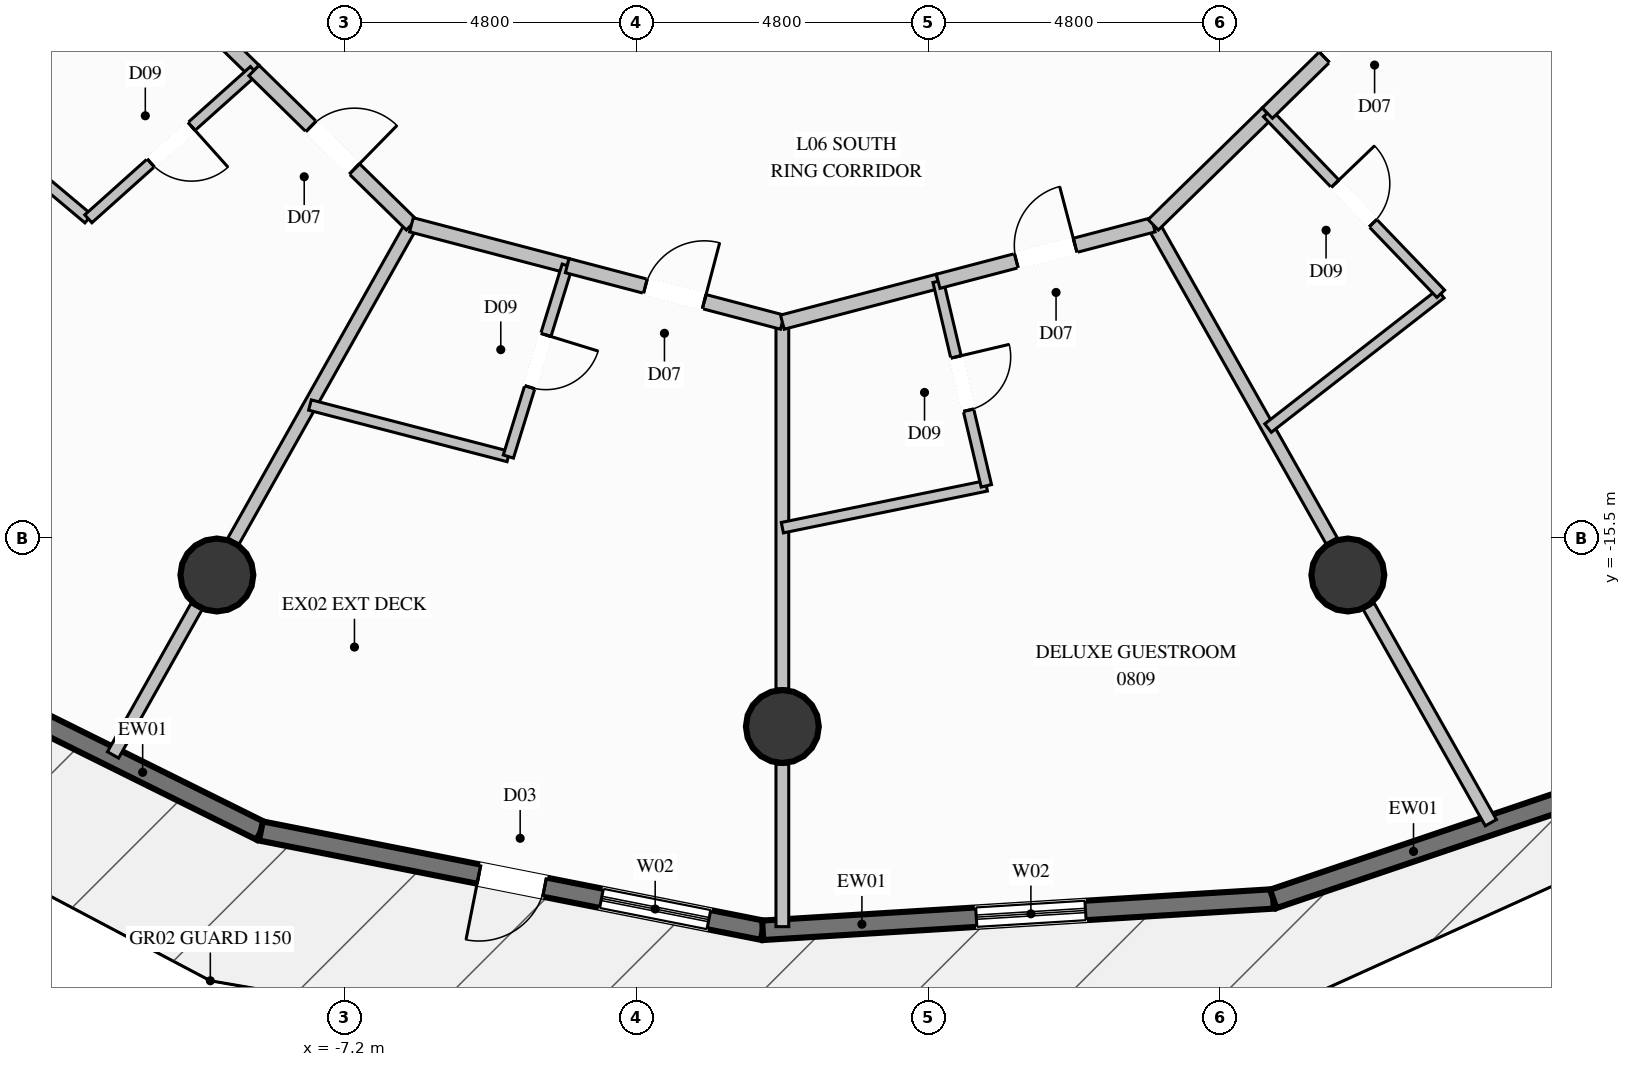
"""IFC4 building model, lengths in metres.
Left out: names, types, materials, properties, quantities, classifications, styles, units other than length and angle.
Written with IfcOpenShell. Run it as: python <this file> out.ifc"""

import sys

from ifc_helpers import new_model, si_unit, direction, frame, frame_2d, origin, origin_2d, place, context, subcontext, project, spatial, rectangle, circle, extrude, element, fill, save


model = new_model("IFC4")
c1 = context("Model", 3, precision=1e-05, world=origin(), true_north=direction((0.0, 1.0)))
c2 = subcontext(c1, "Body", "Model", "MODEL_VIEW")
j1 = project(units=[si_unit("LENGTHUNIT", "METRE"), si_unit("PLANEANGLEUNIT", "RADIAN")], contexts=[c1])
p1 = place(None, origin())
s1 = spatial("IfcSite", under=j1, at=p1, CompositionType="ELEMENT")
p2 = place(p1, origin())
s2 = spatial("IfcBuilding", under=s1, at=p2, CompositionType="ELEMENT")
p3 = place(p2, frame((0.0, 0.0, 32.0)))
s3 = spatial("IfcBuildingStorey", under=s2, at=p3, CompositionType="ELEMENT", Elevation=32.0)
for number, where, z_axis, x_axis in (
    (1, (-9.3, -16.108, 0.0), (0.0, 0.0, 1.0), (1.0, 0.0, 0.0)),
    (2, (0.0, -18.6, 0.0), (0.0, 0.0, 1.0), (1.0, 0.0, 0.0)),
    (3, (9.3, -16.108, 0.0), (0.0, 0.0, 1.0), (1.0, 0.0, 0.0)),
):
    element("IfcColumn", number, at=place(p3, frame(where, z_axis=z_axis, x_axis=x_axis)), inside=s3, PredefinedType="COLUMN", context=c2, shape_type="SweptSolid", body=[
        extrude(circle(Radius=0.6, at=origin_2d()), origin(), (0.0, 0.0, 1.0), 3.6),
    ])
p4 = place(p3, frame((-8.576, -20.318, 0.0), z_axis=(0.0, 0.0, 1.0), x_axis=(-0.895818759339, 0.444419565743, 0.0)))
e4 = element("IfcWall", 4, at=p4, inside=s3, PredefinedType="SOLIDWALL", context=c2, shape_type="SweptSolid", body=[
    extrude(rectangle(XDim=8.15, YDim=0.32, at=frame_2d((4.075, 0.0))), origin(), (0.0, 0.0, 1.0), 3.34),
])
p5 = place(p4, frame((4.592, 0.0, 0.35)))
e5 = element("IfcOpeningElement", 5, at=p5, cuts=e4, PredefinedType="OPENING", context=c2, shape_type="SweptSolid", body=[
    extrude(rectangle(XDim=1.8, YDim=2.6, at=frame_2d((0.9, 1.3))), frame((0.0, 0.17, 0.0), z_axis=(0.0, -1.0, 0.0), x_axis=(1.0, 0.0, 0.0)), (0.0, 0.0, 1.0), 0.34),
])
p6 = place(p3, frame((-0.323, -21.951, 0.0), z_axis=(0.0, 0.0, 1.0), x_axis=(-0.980984848571, 0.194084329288, 0.0)))
e6 = element("IfcWall", 6, at=p6, inside=s3, PredefinedType="SOLIDWALL", context=c2, shape_type="SweptSolid", body=[
    extrude(rectangle(XDim=8.413, YDim=0.32, at=frame_2d((4.207, 0.0))), origin(), (0.0, 0.0, 1.0), 3.34),
])
p7 = place(p6, frame((0.903, 0.0, 0.35)))
e7 = element("IfcOpeningElement", 7, at=p7, cuts=e6, PredefinedType="OPENING", context=c2, shape_type="SweptSolid", body=[
    extrude(rectangle(XDim=1.8, YDim=2.6, at=frame_2d((0.9, 1.3))), frame((0.0, 0.17, 0.0), z_axis=(0.0, -1.0, 0.0), x_axis=(1.0, 0.0, 0.0)), (0.0, 0.0, 1.0), 0.34),
])
p8 = place(p6, frame((3.657, 0.0, 0.0)))
e8 = element("IfcOpeningElement", 8, at=p8, cuts=e6, PredefinedType="OPENING", context=c2, shape_type="SweptSolid", body=[
    extrude(rectangle(XDim=1.1, YDim=2.2, at=frame_2d((0.55, 1.1))), frame((0.0, 0.17, 0.0), z_axis=(0.0, -1.0, 0.0), x_axis=(1.0, 0.0, 0.0)), (0.0, 0.0, 1.0), 0.34),
])
p9 = place(p3, frame((8.073, -21.435, 0.0), z_axis=(0.0, 0.0, 1.0), x_axis=(-0.998117750792, -0.06132663005, 0.0)))
e9 = element("IfcWall", 9, at=p9, inside=s3, PredefinedType="SOLIDWALL", context=c2, shape_type="SweptSolid", body=[
    extrude(rectangle(XDim=8.412, YDim=0.32, at=frame_2d((4.206, 0.0))), origin(), (0.0, 0.0, 1.0), 3.34),
])
p10 = place(p9, frame((3.093, 0.0, 0.35)))
e10 = element("IfcOpeningElement", 10, at=p10, cuts=e9, PredefinedType="OPENING", context=c2, shape_type="SweptSolid", body=[
    extrude(rectangle(XDim=1.8, YDim=2.6, at=frame_2d((0.9, 1.3))), frame((0.0, 0.17, 0.0), z_axis=(0.0, -1.0, 0.0), x_axis=(1.0, 0.0, 0.0)), (0.0, 0.0, 1.0), 0.34),
])
p11 = place(p3, frame((15.793, -18.821, 0.0), z_axis=(0.0, 0.0, 1.0), x_axis=(-0.94717495877, -0.320717317085, 0.0)))
e11 = element("IfcWall", 11, at=p11, inside=s3, PredefinedType="SOLIDWALL", context=c2, shape_type="SweptSolid", body=[
    extrude(rectangle(XDim=8.151, YDim=0.32, at=frame_2d((4.075, 0.0))), origin(), (0.0, 0.0, 1.0), 3.34),
])
p12 = place(p11, frame((1.229, 0.0, 0.35)))
e12 = element("IfcOpeningElement", 12, at=p12, cuts=e11, PredefinedType="OPENING", context=c2, shape_type="SweptSolid", body=[
    extrude(rectangle(XDim=1.8, YDim=2.6, at=frame_2d((0.9, 1.3))), frame((0.0, 0.17, 0.0), z_axis=(0.0, -1.0, 0.0), x_axis=(1.0, 0.0, 0.0)), (0.0, 0.0, 1.0), 0.34),
])
p13 = place(p3, frame((-10.566, -5.975, 0.0), z_axis=(0.0, 0.0, 1.0), x_axis=(-0.861473203585, -0.507803032194, 0.0)))
e13 = element("IfcWall", 13, at=p13, inside=s3, PredefinedType="PARTITIONING", context=c2, shape_type="SweptSolid", body=[
    extrude(rectangle(XDim=5.845, YDim=0.21, at=frame_2d((2.922, 0.0))), origin(), (0.0, 0.0, 1.0), 2.709),
])
p14 = place(p3, frame((-6.1, -10.349, 0.0), z_axis=(0.0, 0.0, 1.0), x_axis=(-0.490503945764, -0.871438970433, 0.0)))
e14 = element("IfcWall", 14, at=p14, inside=s3, PredefinedType="PARTITIONING", context=c2, shape_type="SweptSolid", body=[
    extrude(rectangle(XDim=5.969, YDim=0.21, at=frame_2d((2.985, 0.0))), origin(), (0.0, 0.0, 1.0), 2.709),
])
p15 = place(p3, frame((-9.636, -16.629, 0.0), z_axis=(0.0, 0.0, 1.0), x_axis=(-0.490451821351, -0.871468307475, 0.0)))
e15 = element("IfcWall", 15, at=p15, inside=s3, PredefinedType="PARTITIONING", context=c2, shape_type="SweptSolid", body=[
    extrude(rectangle(XDim=2.798, YDim=0.21, at=frame_2d((1.399, 0.0))), origin(), (0.0, 0.0, 1.0), 3.34),
])
p16 = place(p3, frame((0.0, -11.95, 0.0), z_axis=(0.0, 0.0, 1.0), x_axis=(0.0, -1.0, 0.0)))
e16 = element("IfcWall", 16, at=p16, inside=s3, PredefinedType="PARTITIONING", context=c2, shape_type="SweptSolid", body=[
    extrude(rectangle(XDim=6.03, YDim=0.21, at=frame_2d((3.015, 0.0))), origin(), (0.0, 0.0, 1.0), 2.709),
])
p17 = place(p3, frame((0.0, -19.22, 0.0), z_axis=(0.0, 0.0, 1.0), x_axis=(0.0, -1.0, 0.0)))
e17 = element("IfcWall", 17, at=p17, inside=s3, PredefinedType="PARTITIONING", context=c2, shape_type="SweptSolid", body=[
    extrude(rectangle(XDim=2.671, YDim=0.21, at=frame_2d((1.335, 0.0))), origin(), (0.0, 0.0, 1.0), 3.34),
])
p18 = place(p3, frame((6.1, -10.349, 0.0), z_axis=(0.0, 0.0, 1.0), x_axis=(0.491652896219, -0.870791266401, 0.0)))
e18 = element("IfcWall", 18, at=p18, inside=s3, PredefinedType="PARTITIONING", context=c2, shape_type="SweptSolid", body=[
    extrude(rectangle(XDim=5.969, YDim=0.21, at=frame_2d((2.985, 0.0))), origin(), (0.0, 0.0, 1.0), 2.709),
])
p19 = place(p3, frame((9.643, -16.624, 0.0), z_axis=(0.0, 0.0, 1.0), x_axis=(0.491698874435, -0.87076530528, 0.0)))
e19 = element("IfcWall", 19, at=p19, inside=s3, PredefinedType="PARTITIONING", context=c2, shape_type="SweptSolid", body=[
    extrude(rectangle(XDim=4.086, YDim=0.21, at=frame_2d((2.043, 0.0))), origin(), (0.0, 0.0, 1.0), 3.34),
])
p20 = place(p3, frame((10.566, -5.975, 0.0), z_axis=(0.0, 0.0, 1.0), x_axis=(0.862217531027, -0.506538181374, 0.0)))
e20 = element("IfcWall", 20, at=p20, inside=s3, PredefinedType="PARTITIONING", context=c2, shape_type="SweptSolid", body=[
    extrude(rectangle(XDim=5.845, YDim=0.21, at=frame_2d((2.923, 0.0))), origin(), (0.0, 0.0, 1.0), 2.709),
])
p21 = place(p3, frame((-10.566, -5.975, 0.0), z_axis=(0.0, 0.0, 1.0), x_axis=(0.714506552913, -0.699628748584, 0.0)))
e21 = element("IfcWall", 21, at=p21, inside=s3, PredefinedType="PARTITIONING", context=c2, shape_type="SweptSolid", body=[
    extrude(rectangle(XDim=2.625, YDim=0.24, at=frame_2d((1.313, 0.0))), origin(), (0.0, 0.0, 1.0), 3.34),
])
p22 = place(p3, frame((-14.055, -8.032, 0.0), z_axis=(0.0, 0.0, 1.0), x_axis=(0.765749489357, -0.643138958196, 0.0)))
e22 = element("IfcWall", 22, at=p22, inside=s3, PredefinedType="PLUMBINGWALL", context=c2, shape_type="SweptSolid", body=[
    extrude(rectangle(XDim=3.449, YDim=0.175, at=frame_2d((1.724, 0.0))), origin(), (0.0, 0.0, 1.0), 3.34),
])
p23 = place(p3, frame((-8.69, -7.812, 0.0), z_axis=(0.0, 0.0, 1.0), x_axis=(-0.745157470099, -0.666888554975, 0.0)))
e23 = element("IfcWall", 23, at=p23, inside=s3, PredefinedType="PLUMBINGWALL", context=c2, shape_type="SweptSolid", body=[
    extrude(rectangle(XDim=3.656, YDim=0.175, at=frame_2d((1.828, 0.0))), origin(), (0.0, 0.0, 1.0), 3.34),
])
p24 = place(p23, frame((1.378, 0.0, 0.0)))
e24 = element("IfcOpeningElement", 24, at=p24, cuts=e23, PredefinedType="OPENING", context=c2, shape_type="SweptSolid", body=[
    extrude(rectangle(XDim=0.9, YDim=2.1, at=frame_2d((0.45, 1.05))), frame((0.0, 0.098, 0.0), z_axis=(0.0, -1.0, 0.0), x_axis=(1.0, 0.0, 0.0)), (0.0, 0.0, 1.0), 0.195),
])
p25 = place(p3, frame((-8.69, -7.812, 0.0), z_axis=(0.0, 0.0, 1.0), x_axis=(0.714342093268, -0.699796666029, 0.0)))
e25 = element("IfcWall", 25, at=p25, inside=s3, PredefinedType="PARTITIONING", context=c2, shape_type="SweptSolid", body=[
    extrude(rectangle(XDim=3.625, YDim=0.24, at=frame_2d((1.813, 0.0))), origin(), (0.0, 0.0, 1.0), 3.34),
])
p26 = place(p25, frame((1.313, 0.0, 0.0)))
e26 = element("IfcOpeningElement", 26, at=p26, cuts=e25, PredefinedType="OPENING", context=c2, shape_type="SweptSolid", body=[
    extrude(rectangle(XDim=1.0, YDim=2.2, at=frame_2d((0.5, 1.1))), frame((0.0, 0.13, 0.0), z_axis=(0.0, -1.0, 0.0), x_axis=(1.0, 0.0, 0.0)), (0.0, 0.0, 1.0), 0.26),
])
p27 = place(p3, frame((-6.1, -10.349, 0.0), z_axis=(0.0, 0.0, 1.0), x_axis=(0.967291490053, -0.253667446219, 0.0)))
e27 = element("IfcWall", 27, at=p27, inside=s3, PredefinedType="PARTITIONING", context=c2, shape_type="SweptSolid", body=[
    extrude(rectangle(XDim=2.649, YDim=0.24, at=frame_2d((1.324, 0.0))), origin(), (0.0, 0.0, 1.0), 3.34),
])
p28 = place(p3, frame((-7.769, -13.313, 0.0), z_axis=(0.0, 0.0, 1.0), x_axis=(0.96792648556, -0.251233593596, 0.0)))
e28 = element("IfcWall", 28, at=p28, inside=s3, PredefinedType="PLUMBINGWALL", context=c2, shape_type="SweptSolid", body=[
    extrude(rectangle(XDim=3.371, YDim=0.175, at=frame_2d((1.686, 0.0))), origin(), (0.0, 0.0, 1.0), 3.34),
])
p29 = place(p3, frame((-3.538, -11.021, 0.0), z_axis=(0.0, 0.0, 1.0), x_axis=(-0.294696857094, -0.955590792347, 0.0)))
e29 = element("IfcWall", 29, at=p29, inside=s3, PredefinedType="PLUMBINGWALL", context=c2, shape_type="SweptSolid", body=[
    extrude(rectangle(XDim=3.285, YDim=0.175, at=frame_2d((1.643, 0.0))), origin(), (0.0, 0.0, 1.0), 3.34),
])
p30 = place(p29, frame((1.192, 0.0, 0.0)))
e30 = element("IfcOpeningElement", 30, at=p30, cuts=e29, PredefinedType="OPENING", context=c2, shape_type="SweptSolid", body=[
    extrude(rectangle(XDim=0.9, YDim=2.1, at=frame_2d((0.45, 1.05))), frame((0.0, 0.098, 0.0), z_axis=(0.0, -1.0, 0.0), x_axis=(1.0, 0.0, 0.0)), (0.0, 0.0, 1.0), 0.195),
])
p31 = place(p3, frame((-3.538, -11.021, 0.0), z_axis=(0.0, 0.0, 1.0), x_axis=(0.96721703222, -0.253951201187, 0.0)))
e31 = element("IfcWall", 31, at=p31, inside=s3, PredefinedType="PARTITIONING", context=c2, shape_type="SweptSolid", body=[
    extrude(rectangle(XDim=3.658, YDim=0.24, at=frame_2d((1.829, 0.0))), origin(), (0.0, 0.0, 1.0), 2.919),
])
p32 = place(p31, frame((1.329, 0.0, 0.0)))
e32 = element("IfcOpeningElement", 32, at=p32, cuts=e31, PredefinedType="OPENING", context=c2, shape_type="SweptSolid", body=[
    extrude(rectangle(XDim=1.0, YDim=2.2, at=frame_2d((0.5, 1.1))), frame((0.0, 0.13, 0.0), z_axis=(0.0, -1.0, 0.0), x_axis=(1.0, 0.0, 0.0)), (0.0, 0.0, 1.0), 0.26),
])
p33 = place(p3, frame((0.0, -11.95, 0.0), z_axis=(0.0, 0.0, 1.0), x_axis=(0.967291490053, 0.253667446219, 0.0)))
e33 = element("IfcWall", 33, at=p33, inside=s3, PredefinedType="PARTITIONING", context=c2, shape_type="SweptSolid", body=[
    extrude(rectangle(XDim=2.649, YDim=0.24, at=frame_2d((1.324, 0.0))), origin(), (0.0, 0.0, 1.0), 2.919),
])
p34 = place(p3, frame((0.0, -15.33, 0.0), z_axis=(0.0, 0.0, 1.0), x_axis=(0.979614932167, 0.20088450581, 0.0)))
e34 = element("IfcWall", 34, at=p34, inside=s3, PredefinedType="PLUMBINGWALL", context=c2, shape_type="SweptSolid", body=[
    extrude(rectangle(XDim=3.425, YDim=0.175, at=frame_2d((1.712, 0.0))), origin(), (0.0, 0.0, 1.0), 3.34),
])
p35 = place(p3, frame((2.562, -11.278, 0.0), z_axis=(0.0, 0.0, 1.0), x_axis=(0.229433036384, -0.973324448381, 0.0)))
e35 = element("IfcWall", 35, at=p35, inside=s3, PredefinedType="PLUMBINGWALL", context=c2, shape_type="SweptSolid", body=[
    extrude(rectangle(XDim=3.456, YDim=0.175, at=frame_2d((1.728, 0.0))), origin(), (0.0, 0.0, 1.0), 3.34),
])
p36 = place(p35, frame((1.278, 0.0, 0.0)))
e36 = element("IfcOpeningElement", 36, at=p36, cuts=e35, PredefinedType="OPENING", context=c2, shape_type="SweptSolid", body=[
    extrude(rectangle(XDim=0.9, YDim=2.1, at=frame_2d((0.45, 1.05))), frame((0.0, 0.098, 0.0), z_axis=(0.0, -1.0, 0.0), x_axis=(1.0, 0.0, 0.0)), (0.0, 0.0, 1.0), 0.195),
])
p37 = place(p3, frame((2.562, -11.278, 0.0), z_axis=(0.0, 0.0, 1.0), x_axis=(0.96721703222, 0.253951201187, 0.0)))
e37 = element("IfcWall", 37, at=p37, inside=s3, PredefinedType="PARTITIONING", context=c2, shape_type="SweptSolid", body=[
    extrude(rectangle(XDim=3.658, YDim=0.24, at=frame_2d((1.829, 0.0))), origin(), (0.0, 0.0, 1.0), 2.919),
])
p38 = place(p37, frame((1.329, 0.0, 0.0)))
e38 = element("IfcOpeningElement", 38, at=p38, cuts=e37, PredefinedType="OPENING", context=c2, shape_type="SweptSolid", body=[
    extrude(rectangle(XDim=1.0, YDim=2.2, at=frame_2d((0.5, 1.1))), frame((0.0, 0.13, 0.0), z_axis=(0.0, -1.0, 0.0), x_axis=(1.0, 0.0, 0.0)), (0.0, 0.0, 1.0), 0.26),
])
p39 = place(p3, frame((6.1, -10.349, 0.0), z_axis=(0.0, 0.0, 1.0), x_axis=(0.714460071513, 0.69967621527, 0.0)))
e39 = element("IfcWall", 39, at=p39, inside=s3, PredefinedType="PARTITIONING", context=c2, shape_type="SweptSolid", body=[
    extrude(rectangle(XDim=2.626, YDim=0.24, at=frame_2d((1.313, 0.0))), origin(), (0.0, 0.0, 1.0), 3.34),
])
p40 = place(p3, frame((7.988, -13.692, 0.0), z_axis=(0.0, 0.0, 1.0), x_axis=(0.78932298539, 0.613978195651, 0.0)))
e40 = element("IfcWall", 40, at=p40, inside=s3, PredefinedType="PLUMBINGWALL", context=c2, shape_type="SweptSolid", body=[
    extrude(rectangle(XDim=3.598, YDim=0.175, at=frame_2d((1.799, 0.0))), origin(), (0.0, 0.0, 1.0), 3.34),
])
p41 = place(p3, frame((7.976, -8.512, 0.0), z_axis=(0.0, 0.0, 1.0), x_axis=(0.692493571669, -0.721424045342, 0.0)))
e41 = element("IfcWall", 41, at=p41, inside=s3, PredefinedType="PLUMBINGWALL", context=c2, shape_type="SweptSolid", body=[
    extrude(rectangle(XDim=4.118, YDim=0.175, at=frame_2d((2.059, 0.0))), origin(), (0.0, 0.0, 1.0), 3.34),
])
p42 = place(p41, frame((1.609, 0.0, 0.0)))
e42 = element("IfcOpeningElement", 42, at=p42, cuts=e41, PredefinedType="OPENING", context=c2, shape_type="SweptSolid", body=[
    extrude(rectangle(XDim=0.9, YDim=2.1, at=frame_2d((0.45, 1.05))), frame((0.0, 0.098, 0.0), z_axis=(0.0, -1.0, 0.0), x_axis=(1.0, 0.0, 0.0)), (0.0, 0.0, 1.0), 0.195),
])
p43 = place(p3, frame((7.976, -8.512, 0.0), z_axis=(0.0, 0.0, 1.0), x_axis=(0.714375756875, 0.699762301064, 0.0)))
e43 = element("IfcWall", 43, at=p43, inside=s3, PredefinedType="PARTITIONING", context=c2, shape_type="SweptSolid", body=[
    extrude(rectangle(XDim=3.625, YDim=0.24, at=frame_2d((1.812, 0.0))), origin(), (0.0, 0.0, 1.0), 3.34),
])
p44 = place(p43, frame((1.313, 0.0, 0.0)))
e44 = element("IfcOpeningElement", 44, at=p44, cuts=e43, PredefinedType="OPENING", context=c2, shape_type="SweptSolid", body=[
    extrude(rectangle(XDim=1.0, YDim=2.2, at=frame_2d((0.5, 1.1))), frame((0.0, 0.13, 0.0), z_axis=(0.0, -1.0, 0.0), x_axis=(1.0, 0.0, 0.0)), (0.0, 0.0, 1.0), 0.26),
])
p45 = place(p7, origin())
e45 = element("IfcWindow", 45, at=p45, inside=s3, PartitioningType="SINGLE_PANEL", PredefinedType="WINDOW", context=c2, shape_type="SweptSolid", body=[
    extrude(rectangle(XDim=1.8, YDim=2.6, at=frame_2d((0.9, 1.3))), frame((0.0, 0.03, 0.0), z_axis=(0.0, -1.0, 0.0), x_axis=(1.0, 0.0, 0.0)), (0.0, 0.0, 1.0), 0.06),
])
fill(e7, e45)
p46 = place(p8, origin())
e46 = element("IfcDoor", 46, at=p46, inside=s3, OperationType="SINGLE_SWING_RIGHT", PredefinedType="DOOR", context=c2, shape_type="SweptSolid", body=[
    extrude(rectangle(XDim=1.1, YDim=2.2, at=frame_2d((0.55, 1.1))), frame((0.0, 0.025, 0.0), z_axis=(0.0, -1.0, 0.0), x_axis=(1.0, 0.0, 0.0)), (0.0, 0.0, 1.0), 0.05),
])
fill(e8, e46)
p47 = place(p10, origin())
e47 = element("IfcWindow", 47, at=p47, inside=s3, PartitioningType="SINGLE_PANEL", PredefinedType="WINDOW", context=c2, shape_type="SweptSolid", body=[
    extrude(rectangle(XDim=1.8, YDim=2.6, at=frame_2d((0.9, 1.3))), frame((0.0, 0.03, 0.0), z_axis=(0.0, -1.0, 0.0), x_axis=(1.0, 0.0, 0.0)), (0.0, 0.0, 1.0), 0.06),
])
fill(e10, e47)
p48 = place(p24, origin())
e48 = element("IfcDoor", 48, at=p48, inside=s3, OperationType="SINGLE_SWING_LEFT", PredefinedType="DOOR", context=c2, shape_type="SweptSolid", body=[
    extrude(rectangle(XDim=0.9, YDim=2.1, at=frame_2d((0.45, 1.05))), frame((0.0, 0.025, 0.0), z_axis=(0.0, -1.0, 0.0), x_axis=(1.0, 0.0, 0.0)), (0.0, 0.0, 1.0), 0.05),
])
fill(e24, e48)
p49 = place(p26, origin())
e49 = element("IfcDoor", 49, at=p49, inside=s3, OperationType="SINGLE_SWING_RIGHT", PredefinedType="DOOR", context=c2, shape_type="SweptSolid", body=[
    extrude(rectangle(XDim=1.0, YDim=2.2, at=frame_2d((0.5, 1.1))), frame((0.0, 0.025, 0.0), z_axis=(0.0, -1.0, 0.0), x_axis=(1.0, 0.0, 0.0)), (0.0, 0.0, 1.0), 0.05),
])
fill(e26, e49)
p50 = place(p30, origin())
e50 = element("IfcDoor", 50, at=p50, inside=s3, OperationType="SINGLE_SWING_LEFT", PredefinedType="DOOR", context=c2, shape_type="SweptSolid", body=[
    extrude(rectangle(XDim=0.9, YDim=2.1, at=frame_2d((0.45, 1.05))), frame((0.0, 0.025, 0.0), z_axis=(0.0, -1.0, 0.0), x_axis=(1.0, 0.0, 0.0)), (0.0, 0.0, 1.0), 0.05),
])
fill(e30, e50)
p51 = place(p32, origin())
e51 = element("IfcDoor", 51, at=p51, inside=s3, OperationType="SINGLE_SWING_RIGHT", PredefinedType="DOOR", context=c2, shape_type="SweptSolid", body=[
    extrude(rectangle(XDim=1.0, YDim=2.2, at=frame_2d((0.5, 1.1))), frame((0.0, 0.025, 0.0), z_axis=(0.0, -1.0, 0.0), x_axis=(1.0, 0.0, 0.0)), (0.0, 0.0, 1.0), 0.05),
])
fill(e32, e51)
p52 = place(p36, origin())
e52 = element("IfcDoor", 52, at=p52, inside=s3, OperationType="SINGLE_SWING_LEFT", PredefinedType="DOOR", context=c2, shape_type="SweptSolid", body=[
    extrude(rectangle(XDim=0.9, YDim=2.1, at=frame_2d((0.45, 1.05))), frame((0.0, 0.025, 0.0), z_axis=(0.0, -1.0, 0.0), x_axis=(1.0, 0.0, 0.0)), (0.0, 0.0, 1.0), 0.05),
])
fill(e36, e52)
p53 = place(p38, origin())
e53 = element("IfcDoor", 53, at=p53, inside=s3, OperationType="SINGLE_SWING_RIGHT", PredefinedType="DOOR", context=c2, shape_type="SweptSolid", body=[
    extrude(rectangle(XDim=1.0, YDim=2.2, at=frame_2d((0.5, 1.1))), frame((0.0, 0.025, 0.0), z_axis=(0.0, -1.0, 0.0), x_axis=(1.0, 0.0, 0.0)), (0.0, 0.0, 1.0), 0.05),
])
fill(e38, e53)
p54 = place(p42, origin())
e54 = element("IfcDoor", 54, at=p54, inside=s3, OperationType="SINGLE_SWING_LEFT", PredefinedType="DOOR", context=c2, shape_type="SweptSolid", body=[
    extrude(rectangle(XDim=0.9, YDim=2.1, at=frame_2d((0.45, 1.05))), frame((0.0, 0.025, 0.0), z_axis=(0.0, -1.0, 0.0), x_axis=(1.0, 0.0, 0.0)), (0.0, 0.0, 1.0), 0.05),
])
fill(e42, e54)
p55 = place(p44, origin())
e55 = element("IfcDoor", 55, at=p55, inside=s3, OperationType="SINGLE_SWING_RIGHT", PredefinedType="DOOR", context=c2, shape_type="SweptSolid", body=[
    extrude(rectangle(XDim=1.0, YDim=2.2, at=frame_2d((0.5, 1.1))), frame((0.0, 0.025, 0.0), z_axis=(0.0, -1.0, 0.0), x_axis=(1.0, 0.0, 0.0)), (0.0, 0.0, 1.0), 0.05),
])
fill(e44, e55)
save(model, sys.argv[1])
